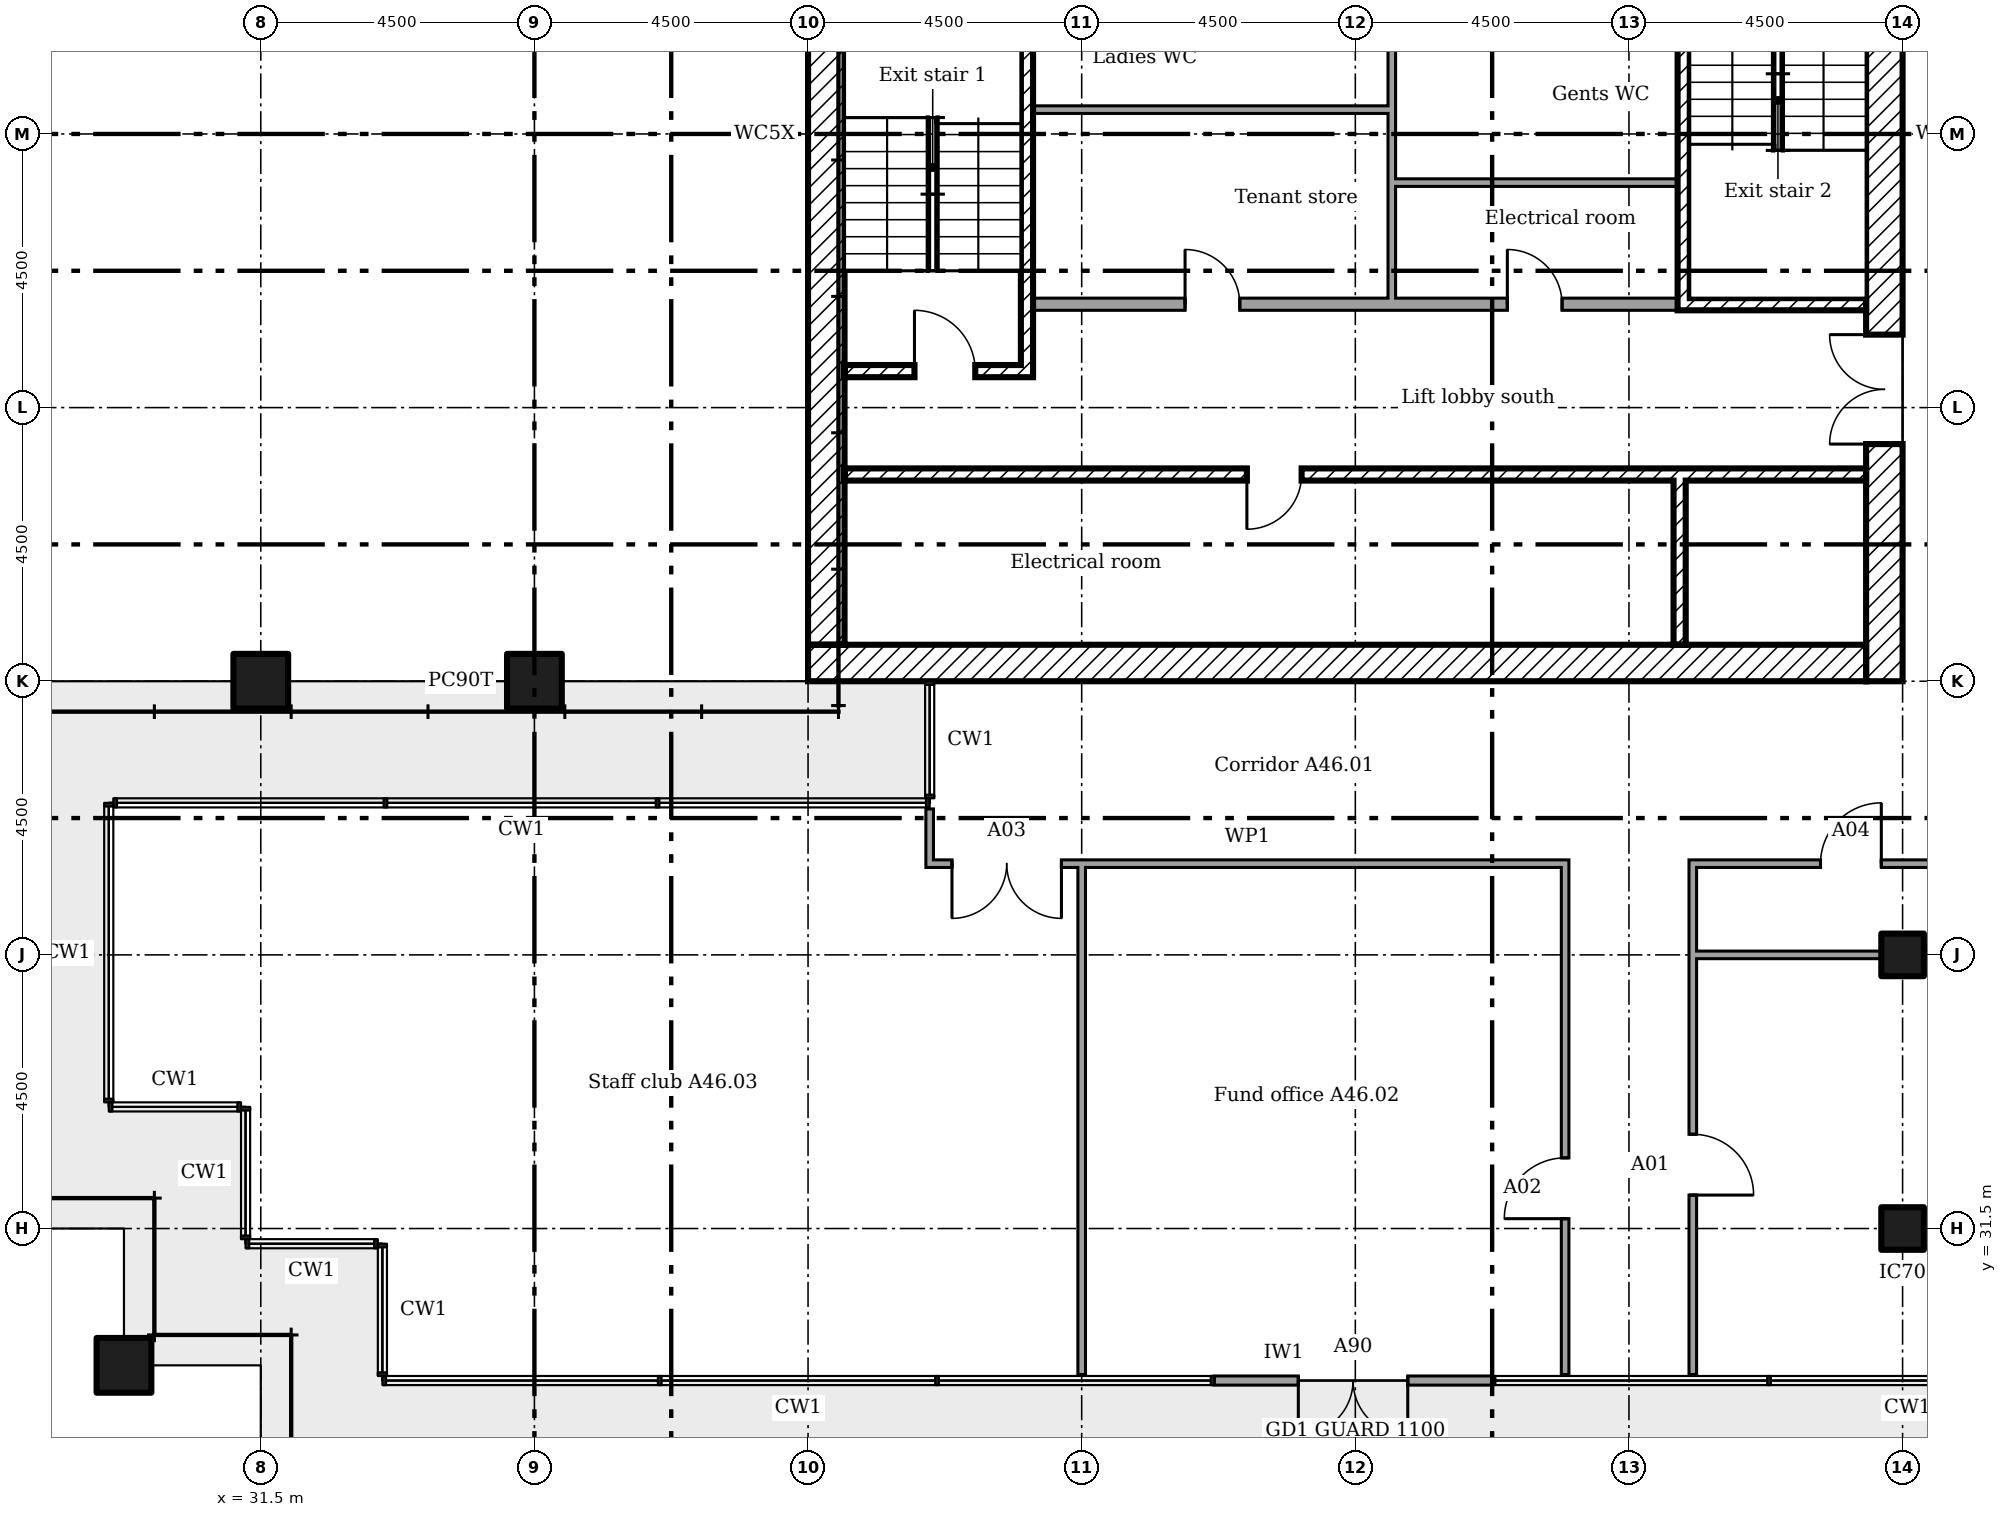
"""IFC4 building model, lengths in metres.
Left out: names, types, materials, properties, quantities, classifications, styles, units other than length and angle.
Written with IfcOpenShell. Run it as: python <this file> out.ifc"""

import sys

from ifc_helpers import new_model, si_unit, direction, frame, frame_2d, origin, origin_2d, place, context, subcontext, project, spatial, rectangle, extrude, element, fill, save


model = new_model("IFC4")
c1 = context("Model", 3, precision=1e-05, world=origin(), true_north=direction((0.0, 1.0)))
c2 = subcontext(c1, "Body", "Model", "MODEL_VIEW")
j1 = project(units=[si_unit("LENGTHUNIT", "METRE"), si_unit("PLANEANGLEUNIT", "RADIAN")], contexts=[c1])
p1 = place(None, origin())
s1 = spatial("IfcSite", under=j1, at=p1, CompositionType="ELEMENT")
p2 = place(p1, origin())
s2 = spatial("IfcBuilding", under=s1, at=p2, CompositionType="ELEMENT")
p3 = place(p2, frame((0.0, 0.0, 183.4)))
s3 = spatial("IfcBuildingStorey", under=s2, at=p3, CompositionType="ELEMENT", Elevation=183.4)
for number, where in (
    (1, (36.0, 40.5, 0.0)),
    (2, (31.5, 40.5, 0.0)),
    (3, (29.25, 29.25, 0.0)),
):
    element("IfcColumn", number, at=place(p3, frame(where)), inside=s3, PredefinedType="COLUMN", context=c2, shape_type="SweptSolid", body=[
        extrude(rectangle(XDim=0.9, YDim=0.9, at=origin_2d()), origin(), (0.0, 0.0, 1.0), 3.6),
    ])
for number, where in (
    (4, (58.5, 31.5, 0.0)),
    (5, (58.5, 36.0, 0.0)),
):
    element("IfcColumn", number, at=place(p3, frame(where)), inside=s3, PredefinedType="COLUMN", context=c2, shape_type="SweptSolid", body=[
        extrude(rectangle(XDim=0.7, YDim=0.7, at=origin_2d()), origin(), (0.0, 0.0, 1.0), 3.6),
    ])
p4 = place(p3, frame((47.182, 29.0, 0.0)))
e6 = element("IfcWall", 6, at=p4, inside=s3, PredefinedType="SOLIDWALL", context=c2, shape_type="SweptSolid", body=[
    extrude(rectangle(XDim=4.561, YDim=0.15, at=frame_2d((2.28, 0.0))), origin(), (0.0, 0.0, 1.0), 3.45),
])
p5 = place(p4, frame((1.38, 0.0, 0.0)))
e7 = element("IfcOpeningElement", 7, at=p5, cuts=e6, PredefinedType="OPENING", context=c2, shape_type="SweptSolid", body=[
    extrude(rectangle(XDim=1.8, YDim=2.4, at=frame_2d((0.9, 1.2))), frame((0.0, 0.085, 0.0), z_axis=(0.0, -1.0, 0.0), x_axis=(1.0, 0.0, 0.0)), (0.0, 0.0, 1.0), 0.17),
])
p6 = place(p3, frame((58.2, 40.5, 0.0), z_axis=(0.0, 0.0, 1.0), x_axis=(0.0, 1.0, 0.0)))
e8 = element("IfcWall", 8, at=p6, inside=s3, PredefinedType="SHEAR", context=c2, shape_type="SweptSolid", body=[
    extrude(rectangle(XDim=18.0, YDim=0.6, at=frame_2d((9.0, 0.0))), origin(), (0.0, 0.0, 1.0), 3.35),
])
p7 = place(p6, frame((13.15, 0.0, 0.0)))
e9 = element("IfcOpeningElement", 9, at=p7, cuts=e8, PredefinedType="OPENING", context=c2, shape_type="SweptSolid", body=[
    extrude(rectangle(XDim=1.2, YDim=2.1, at=frame_2d((0.6, 1.05))), frame((0.0, 0.31, 0.0), z_axis=(0.0, -1.0, 0.0), x_axis=(1.0, 0.0, 0.0)), (0.0, 0.0, 1.0), 0.62),
])
p8 = place(p6, frame((3.9, 0.0, 0.0)))
e10 = element("IfcOpeningElement", 10, at=p8, cuts=e8, PredefinedType="OPENING", context=c2, shape_type="SweptSolid", body=[
    extrude(rectangle(XDim=1.8, YDim=2.1, at=frame_2d((0.9, 1.05))), frame((0.0, 0.31, 0.0), z_axis=(0.0, -1.0, 0.0), x_axis=(1.0, 0.0, 0.0)), (0.0, 0.0, 1.0), 0.62),
])
p9 = place(p6, frame((11.525, 0.0, 0.0)))
e11 = element("IfcOpeningElement", 11, at=p9, cuts=e8, PredefinedType="OPENING", context=c2, shape_type="SweptSolid", body=[
    extrude(rectangle(XDim=1.0, YDim=2.1, at=frame_2d((0.5, 1.05))), frame((0.0, 0.31, 0.0), z_axis=(0.0, -1.0, 0.0), x_axis=(1.0, 0.0, 0.0)), (0.0, 0.0, 1.0), 0.62),
])
p10 = place(p3, frame((40.5, 40.8, 0.0)))
e12 = element("IfcWall", 12, at=p10, inside=s3, PredefinedType="SHEAR", context=c2, shape_type="SweptSolid", body=[
    extrude(rectangle(XDim=17.4, YDim=0.6, at=frame_2d((8.7, 0.0))), origin(), (0.0, 0.0, 1.0), 3.35),
])
p11 = place(p3, frame((40.8, 41.1, 0.0), z_axis=(0.0, 0.0, 1.0), x_axis=(0.0, 1.0, 0.0)))
e13 = element("IfcWall", 13, at=p11, inside=s3, PredefinedType="SHEAR", context=c2, shape_type="SweptSolid", body=[
    extrude(rectangle(XDim=16.8, YDim=0.6, at=frame_2d((8.4, 0.0))), origin(), (0.0, 0.0, 1.0), 3.35),
])
p12 = place(p3, frame((54.833, 41.1, 0.0), z_axis=(0.0, 0.0, 1.0), x_axis=(0.0, 1.0, 0.0)))
e14 = element("IfcWall", 14, at=p12, inside=s3, PredefinedType="SHEAR", context=c2, shape_type="SweptSolid", body=[
    extrude(rectangle(XDim=2.7, YDim=0.2, at=frame_2d((1.35, 0.0))), origin(), (0.0, 0.0, 1.0), 3.35),
])
p13 = place(p3, frame((41.1, 43.9, 0.0)))
e15 = element("IfcWall", 15, at=p13, inside=s3, PredefinedType="SHEAR", context=c2, shape_type="SweptSolid", body=[
    extrude(rectangle(XDim=16.8, YDim=0.2, at=frame_2d((8.4, 0.0))), origin(), (0.0, 0.0, 1.0), 3.35),
])
p14 = place(p13, frame((6.617, 0.0, 0.0)))
e16 = element("IfcOpeningElement", 16, at=p14, cuts=e15, PredefinedType="OPENING", context=c2, shape_type="SweptSolid", body=[
    extrude(rectangle(XDim=0.9, YDim=2.1, at=frame_2d((0.45, 1.05))), frame((0.0, 0.11, 0.0), z_axis=(0.0, -1.0, 0.0), x_axis=(1.0, 0.0, 0.0)), (0.0, 0.0, 1.0), 0.22),
])
p15 = place(p3, frame((44.1, 45.5, 0.0), z_axis=(0.0, 0.0, 1.0), x_axis=(0.0, 1.0, 0.0)))
e17 = element("IfcWall", 17, at=p15, inside=s3, PredefinedType="SHEAR", context=c2, shape_type="SweptSolid", body=[
    extrude(rectangle(XDim=6.9, YDim=0.2, at=frame_2d((3.45, 0.0))), origin(), (0.0, 0.0, 1.0), 3.35),
])
p16 = place(p3, frame((41.1, 45.6, 0.0)))
e18 = element("IfcWall", 18, at=p16, inside=s3, PredefinedType="SHEAR", context=c2, shape_type="SweptSolid", body=[
    extrude(rectangle(XDim=2.9, YDim=0.2, at=frame_2d((1.45, 0.0))), origin(), (0.0, 0.0, 1.0), 3.35),
])
p17 = place(p16, frame((1.15, 0.0, 0.0)))
e19 = element("IfcOpeningElement", 19, at=p17, cuts=e18, PredefinedType="OPENING", context=c2, shape_type="SweptSolid", body=[
    extrude(rectangle(XDim=1.0, YDim=2.1, at=frame_2d((0.5, 1.05))), frame((0.0, 0.11, 0.0), z_axis=(0.0, -1.0, 0.0), x_axis=(1.0, 0.0, 0.0)), (0.0, 0.0, 1.0), 0.22),
])
p18 = place(p3, frame((54.8, 46.7, 0.0)))
e20 = element("IfcWall", 20, at=p18, inside=s3, PredefinedType="SHEAR", context=c2, shape_type="SweptSolid", body=[
    extrude(rectangle(XDim=3.1, YDim=0.2, at=frame_2d((1.55, 0.0))), origin(), (0.0, 0.0, 1.0), 3.35),
])
p19 = place(p3, frame((54.9, 46.8, 0.0), z_axis=(0.0, 0.0, 1.0), x_axis=(0.0, 1.0, 0.0)))
e21 = element("IfcWall", 21, at=p19, inside=s3, PredefinedType="SHEAR", context=c2, shape_type="SweptSolid", body=[
    extrude(rectangle(XDim=6.5, YDim=0.2, at=frame_2d((3.25, 0.0))), origin(), (0.0, 0.0, 1.0), 3.35),
])
p20 = place(p3, frame((44.2, 46.7, 0.0)))
e22 = element("IfcWall", 22, at=p20, inside=s3, PredefinedType="PARTITIONING", context=c2, shape_type="SweptSolid", body=[
    extrude(rectangle(XDim=10.6, YDim=0.2, at=frame_2d((5.3, 0.0))), origin(), (0.0, 0.0, 1.0), 3.35),
])
p21 = place(p20, frame((2.5, 0.0, 0.0)))
e23 = element("IfcOpeningElement", 23, at=p21, cuts=e22, PredefinedType="OPENING", context=c2, shape_type="SweptSolid", body=[
    extrude(rectangle(XDim=0.9, YDim=2.1, at=frame_2d((0.45, 1.05))), frame((0.0, 0.11, 0.0), z_axis=(0.0, -1.0, 0.0), x_axis=(1.0, 0.0, 0.0)), (0.0, 0.0, 1.0), 0.22),
])
p22 = place(p20, frame((7.8, 0.0, 0.0)))
e24 = element("IfcOpeningElement", 24, at=p22, cuts=e22, PredefinedType="OPENING", context=c2, shape_type="SweptSolid", body=[
    extrude(rectangle(XDim=0.9, YDim=2.1, at=frame_2d((0.45, 1.05))), frame((0.0, 0.11, 0.0), z_axis=(0.0, -1.0, 0.0), x_axis=(1.0, 0.0, 0.0)), (0.0, 0.0, 1.0), 0.22),
])
p23 = place(p3, frame((50.1, 46.8, 0.0), z_axis=(0.0, 0.0, 1.0), x_axis=(0.0, 1.0, 0.0)))
e25 = element("IfcWall", 25, at=p23, inside=s3, PredefinedType="PARTITIONING", context=c2, shape_type="SweptSolid", body=[
    extrude(rectangle(XDim=1.962, YDim=0.125, at=frame_2d((0.981, 0.0))), origin(), (0.0, 0.0, 1.0), 3.35),
])
p24 = place(p3, frame((54.8, 48.7, 0.0), z_axis=(0.0, 0.0, 1.0), x_axis=(-1.0, 0.0, 0.0)))
e26 = element("IfcWall", 26, at=p24, inside=s3, PredefinedType="PARTITIONING", context=c2, shape_type="SweptSolid", body=[
    extrude(rectangle(XDim=4.637, YDim=0.125, at=frame_2d((2.319, 0.0))), origin(), (0.0, 0.0, 1.0), 3.35),
])
p25 = place(p3, frame((50.1, 48.7, 0.0), z_axis=(0.0, 0.0, 1.0), x_axis=(0.0, 1.0, 0.0)))
e27 = element("IfcWall", 27, at=p25, inside=s3, PredefinedType="PARTITIONING", context=c2, shape_type="SweptSolid", body=[
    extrude(rectangle(XDim=1.262, YDim=0.125, at=frame_2d((0.631, 0.0))), origin(), (0.0, 0.0, 1.0), 3.35),
])
p26 = place(p3, frame((50.038, 49.9, 0.0), z_axis=(0.0, 0.0, 1.0), x_axis=(-1.0, 0.0, 0.0)))
e28 = element("IfcWall", 28, at=p26, inside=s3, PredefinedType="PARTITIONING", context=c2, shape_type="SweptSolid", body=[
    extrude(rectangle(XDim=5.838, YDim=0.125, at=frame_2d((2.919, 0.0))), origin(), (0.0, 0.0, 1.0), 3.35),
])
p27 = place(p3, frame((50.1, 49.9, 0.0), z_axis=(0.0, 0.0, 1.0), x_axis=(0.0, 1.0, 0.0)))
e29 = element("IfcWall", 29, at=p27, inside=s3, PredefinedType="PARTITIONING", context=c2, shape_type="SweptSolid", body=[
    extrude(rectangle(XDim=1.9, YDim=0.125, at=frame_2d((0.95, 0.0))), origin(), (0.0, 0.0, 1.0), 3.35),
])
p28 = place(p3, frame((55.05, 36.0, 0.0)))
e30 = element("IfcWall", 30, at=p28, inside=s3, PredefinedType="PARTITIONING", context=c2, shape_type="SweptSolid", body=[
    extrude(rectangle(XDim=3.1, YDim=0.125, at=frame_2d((1.55, 0.0))), origin(), (0.0, 0.0, 1.0), 3.45),
])
p29 = place(p3, frame((58.85, 36.0, 0.0)))
e31 = element("IfcWall", 31, at=p29, inside=s3, PredefinedType="PARTITIONING", context=c2, shape_type="SweptSolid", body=[
    extrude(rectangle(XDim=11.05, YDim=0.125, at=frame_2d((5.525, 0.0))), origin(), (0.0, 0.0, 1.0), 2.766),
])
p30 = place(p3, frame((42.438, 37.5, 0.0)))
e32 = element("IfcWall", 32, at=p30, inside=s3, PredefinedType="PARTITIONING", context=c2, shape_type="SweptSolid", body=[
    extrude(rectangle(XDim=10.575, YDim=0.125, at=frame_2d((5.288, 0.0))), origin(), (0.0, 0.0, 1.0), 3.45),
])
p31 = place(p30, frame((0.429, 0.0, 0.0)))
e33 = element("IfcOpeningElement", 33, at=p31, cuts=e32, PredefinedType="OPENING", context=c2, shape_type="SweptSolid", body=[
    extrude(rectangle(XDim=1.8, YDim=2.1, at=frame_2d((0.9, 1.05))), frame((0.0, 0.073, 0.0), z_axis=(0.0, -1.0, 0.0), x_axis=(1.0, 0.0, 0.0)), (0.0, 0.0, 1.0), 0.145),
])
p32 = place(p3, frame((54.988, 37.5, 0.0)))
e34 = element("IfcWall", 34, at=p32, inside=s3, PredefinedType="PARTITIONING", context=c2, shape_type="SweptSolid", body=[
    extrude(rectangle(XDim=6.275, YDim=0.125, at=frame_2d((3.137, 0.0))), origin(), (0.0, 0.0, 1.0), 3.45),
])
p33 = place(p32, frame((2.163, 0.0, 0.0)))
e35 = element("IfcOpeningElement", 35, at=p33, cuts=e34, PredefinedType="OPENING", context=c2, shape_type="SweptSolid", body=[
    extrude(rectangle(XDim=1.0, YDim=2.1, at=frame_2d((0.5, 1.05))), frame((0.0, 0.073, 0.0), z_axis=(0.0, -1.0, 0.0), x_axis=(1.0, 0.0, 0.0)), (0.0, 0.0, 1.0), 0.145),
])
p34 = place(p3, frame((42.5, 37.562, 0.0), z_axis=(0.0, 0.0, 1.0), x_axis=(0.0, 1.0, 0.0)))
e36 = element("IfcWall", 36, at=p34, inside=s3, PredefinedType="PARTITIONING", context=c2, shape_type="SweptSolid", body=[
    extrude(rectangle(XDim=0.837, YDim=0.125, at=frame_2d((0.419, 0.0))), origin(), (0.0, 0.0, 1.0), 3.45),
])
p35 = place(p3, frame((45.0, 29.1, 0.0), z_axis=(0.0, 0.0, 1.0), x_axis=(0.0, 1.0, 0.0)))
e37 = element("IfcWall", 37, at=p35, inside=s3, PredefinedType="PARTITIONING", context=c2, shape_type="SweptSolid", body=[
    extrude(rectangle(XDim=8.4, YDim=0.125, at=frame_2d((4.2, 0.0))), origin(), (0.0, 0.0, 1.0), 2.766),
])
p36 = place(p3, frame((52.95, 29.1, 0.0), z_axis=(0.0, 0.0, 1.0), x_axis=(0.0, 1.0, 0.0)))
e38 = element("IfcWall", 38, at=p36, inside=s3, PredefinedType="PARTITIONING", context=c2, shape_type="SweptSolid", body=[
    extrude(rectangle(XDim=8.337, YDim=0.125, at=frame_2d((4.169, 0.0))), origin(), (0.0, 0.0, 1.0), 3.45),
])
p37 = place(p36, frame((2.562, 0.0, 0.0)))
e39 = element("IfcOpeningElement", 39, at=p37, cuts=e38, PredefinedType="OPENING", context=c2, shape_type="SweptSolid", body=[
    extrude(rectangle(XDim=1.0, YDim=2.1, at=frame_2d((0.5, 1.05))), frame((0.0, 0.073, 0.0), z_axis=(0.0, -1.0, 0.0), x_axis=(1.0, 0.0, 0.0)), (0.0, 0.0, 1.0), 0.145),
])
p38 = place(p3, frame((55.05, 29.1, 0.0), z_axis=(0.0, 0.0, 1.0), x_axis=(0.0, 1.0, 0.0)))
e40 = element("IfcWall", 40, at=p38, inside=s3, PredefinedType="PARTITIONING", context=c2, shape_type="SweptSolid", body=[
    extrude(rectangle(XDim=8.337, YDim=0.125, at=frame_2d((4.169, 0.0))), origin(), (0.0, 0.0, 1.0), 3.45),
])
p39 = place(p38, frame((2.95, 0.0, 0.0)))
e41 = element("IfcOpeningElement", 41, at=p39, cuts=e40, PredefinedType="OPENING", context=c2, shape_type="SweptSolid", body=[
    extrude(rectangle(XDim=1.0, YDim=2.1, at=frame_2d((0.5, 1.05))), frame((0.0, 0.073, 0.0), z_axis=(0.0, -1.0, 0.0), x_axis=(1.0, 0.0, 0.0)), (0.0, 0.0, 1.0), 0.145),
])
p40 = place(p5, frame((1.8, 0.0, 0.0), x_axis=(-1.0, 0.0, 0.0)))
e42 = element("IfcDoor", 42, at=p40, inside=s3, OperationType="DOUBLE_DOOR_DOUBLE_SWING", PredefinedType="NOTDEFINED", context=c2, shape_type="SweptSolid", body=[
    extrude(rectangle(XDim=1.8, YDim=2.4, at=frame_2d((0.9, 1.2))), frame((0.0, 0.025, 0.0), z_axis=(0.0, -1.0, 0.0), x_axis=(1.0, 0.0, 0.0)), (0.0, 0.0, 1.0), 0.05),
])
fill(e7, e42)
p41 = place(p8, origin())
e43 = element("IfcDoor", 43, at=p41, inside=s3, OperationType="DOUBLE_DOOR_SINGLE_SWING", PredefinedType="DOOR", context=c2, shape_type="SweptSolid", body=[
    extrude(rectangle(XDim=1.8, YDim=2.1, at=frame_2d((0.9, 1.05))), frame((0.0, 0.025, 0.0), z_axis=(0.0, -1.0, 0.0), x_axis=(1.0, 0.0, 0.0)), (0.0, 0.0, 1.0), 0.05),
])
fill(e10, e43)
p42 = place(p17, origin())
e44 = element("IfcDoor", 44, at=p42, inside=s3, OperationType="SINGLE_SWING_RIGHT", PredefinedType="DOOR", context=c2, shape_type="SweptSolid", body=[
    extrude(rectangle(XDim=1.0, YDim=2.1, at=frame_2d((0.5, 1.05))), frame((0.0, 0.025, 0.0), z_axis=(0.0, -1.0, 0.0), x_axis=(1.0, 0.0, 0.0)), (0.0, 0.0, 1.0), 0.05),
])
fill(e19, e44)
p43 = place(p14, frame((0.9, 0.0, 0.0), x_axis=(-1.0, 0.0, 0.0)))
e45 = element("IfcDoor", 45, at=p43, inside=s3, OperationType="SINGLE_SWING_LEFT", PredefinedType="DOOR", context=c2, shape_type="SweptSolid", body=[
    extrude(rectangle(XDim=0.9, YDim=2.1, at=frame_2d((0.45, 1.05))), frame((0.0, 0.025, 0.0), z_axis=(0.0, -1.0, 0.0), x_axis=(1.0, 0.0, 0.0)), (0.0, 0.0, 1.0), 0.05),
])
fill(e16, e45)
p44 = place(p21, origin())
e46 = element("IfcDoor", 46, at=p44, inside=s3, OperationType="SINGLE_SWING_RIGHT", PredefinedType="DOOR", context=c2, shape_type="SweptSolid", body=[
    extrude(rectangle(XDim=0.9, YDim=2.1, at=frame_2d((0.45, 1.05))), frame((0.0, 0.025, 0.0), z_axis=(0.0, -1.0, 0.0), x_axis=(1.0, 0.0, 0.0)), (0.0, 0.0, 1.0), 0.05),
])
fill(e23, e46)
p45 = place(p22, origin())
e47 = element("IfcDoor", 47, at=p45, inside=s3, OperationType="SINGLE_SWING_RIGHT", PredefinedType="DOOR", context=c2, shape_type="SweptSolid", body=[
    extrude(rectangle(XDim=0.9, YDim=2.1, at=frame_2d((0.45, 1.05))), frame((0.0, 0.025, 0.0), z_axis=(0.0, -1.0, 0.0), x_axis=(1.0, 0.0, 0.0)), (0.0, 0.0, 1.0), 0.05),
])
fill(e24, e47)
p46 = place(p39, frame((1.0, 0.0, 0.0), x_axis=(-1.0, 0.0, 0.0)))
e48 = element("IfcDoor", 48, at=p46, inside=s3, OperationType="SINGLE_SWING_LEFT", PredefinedType="DOOR", context=c2, shape_type="SweptSolid", body=[
    extrude(rectangle(XDim=1.0, YDim=2.1, at=frame_2d((0.5, 1.05))), frame((0.0, 0.025, 0.0), z_axis=(0.0, -1.0, 0.0), x_axis=(1.0, 0.0, 0.0)), (0.0, 0.0, 1.0), 0.05),
])
fill(e41, e48)
p47 = place(p37, origin())
e49 = element("IfcDoor", 49, at=p47, inside=s3, OperationType="SINGLE_SWING_RIGHT", PredefinedType="DOOR", context=c2, shape_type="SweptSolid", body=[
    extrude(rectangle(XDim=1.0, YDim=2.1, at=frame_2d((0.5, 1.05))), frame((0.0, 0.025, 0.0), z_axis=(0.0, -1.0, 0.0), x_axis=(1.0, 0.0, 0.0)), (0.0, 0.0, 1.0), 0.05),
])
fill(e39, e49)
p48 = place(p31, frame((1.8, 0.0, 0.0), x_axis=(-1.0, 0.0, 0.0)))
e50 = element("IfcDoor", 50, at=p48, inside=s3, OperationType="DOUBLE_DOOR_SINGLE_SWING", PredefinedType="DOOR", context=c2, shape_type="SweptSolid", body=[
    extrude(rectangle(XDim=1.8, YDim=2.1, at=frame_2d((0.9, 1.05))), frame((0.0, 0.025, 0.0), z_axis=(0.0, -1.0, 0.0), x_axis=(1.0, 0.0, 0.0)), (0.0, 0.0, 1.0), 0.05),
])
fill(e33, e50)
p49 = place(p33, origin())
e51 = element("IfcDoor", 51, at=p49, inside=s3, OperationType="SINGLE_SWING_LEFT", PredefinedType="DOOR", context=c2, shape_type="SweptSolid", body=[
    extrude(rectangle(XDim=1.0, YDim=2.1, at=frame_2d((0.5, 1.05))), frame((0.0, 0.025, 0.0), z_axis=(0.0, -1.0, 0.0), x_axis=(1.0, 0.0, 0.0)), (0.0, 0.0, 1.0), 0.05),
])
fill(e35, e51)
save(model, sys.argv[1])
